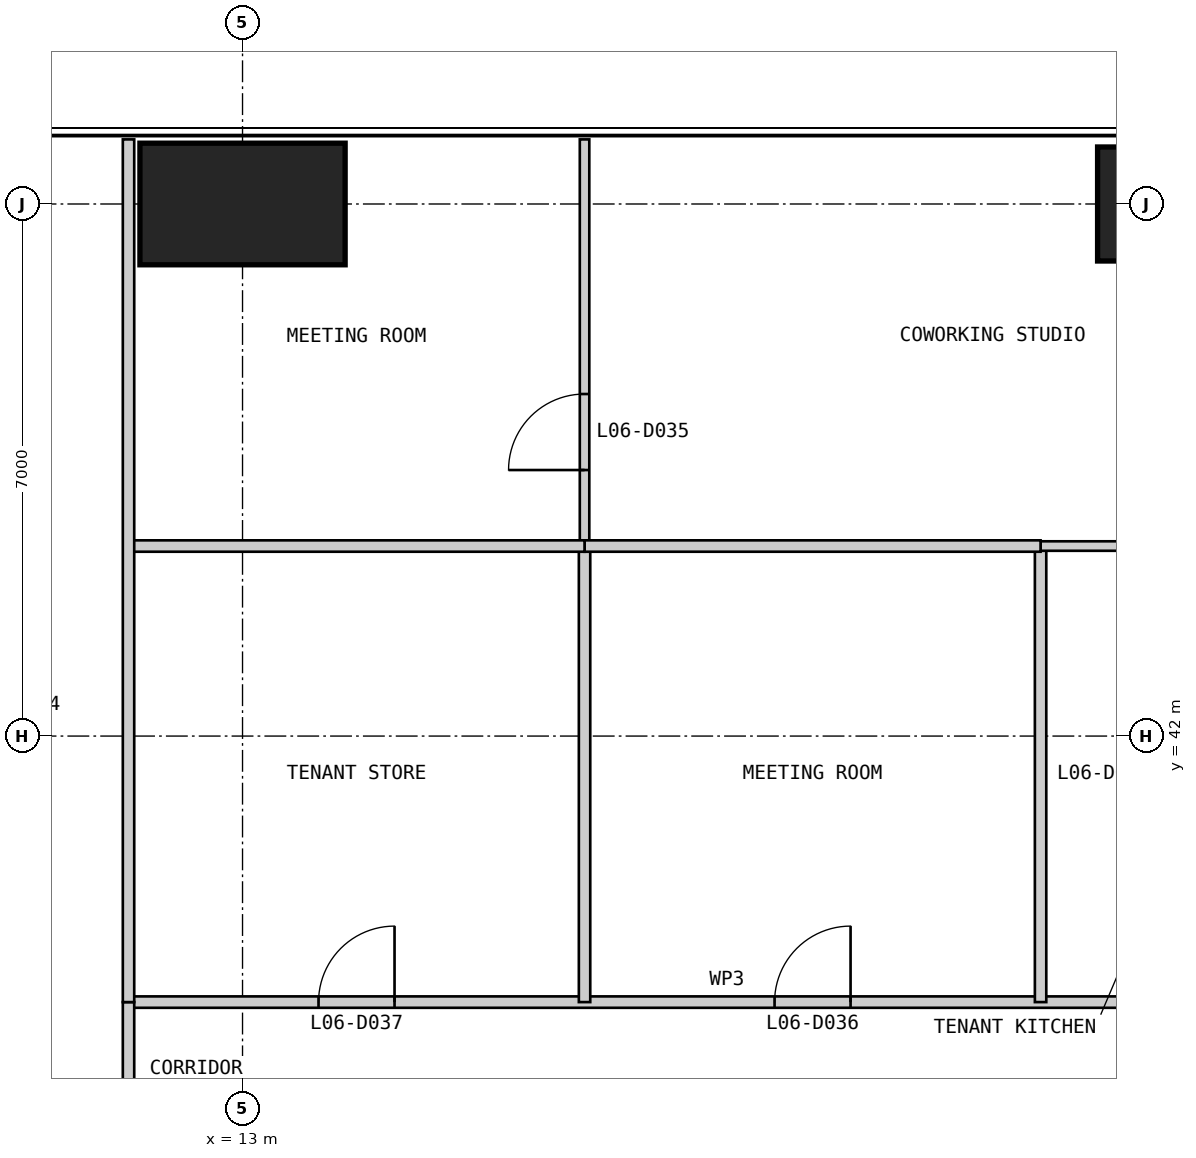
"""IFC4 building model, lengths in metres.
Left out: names, types, materials, properties, quantities, classifications, styles, units other than length and angle.
Written with IfcOpenShell. Run it as: python <this file> out.ifc"""

import sys

from ifc_helpers import new_model, si_unit, direction, frame, frame_2d, origin, origin_2d, place, context, subcontext, project, spatial, rectangle, extrude, element, fill, save


model = new_model("IFC4")
c1 = context("Model", 3, precision=1e-05, world=origin(), true_north=direction((0.0, 1.0)))
c2 = subcontext(c1, "Body", "Model", "MODEL_VIEW")
j1 = project(units=[si_unit("LENGTHUNIT", "METRE"), si_unit("PLANEANGLEUNIT", "RADIAN")], contexts=[c1])
p1 = place(None, origin())
s1 = spatial("IfcSite", under=j1, at=p1, CompositionType="ELEMENT")
p2 = place(p1, origin())
s2 = spatial("IfcBuilding", under=s1, at=p2, CompositionType="ELEMENT")
p3 = place(p2, frame((0.0, 0.0, 31.0)))
s3 = spatial("IfcBuildingStorey", under=s2, at=p3, CompositionType="ELEMENT", Elevation=31.0)
p4 = place(p3, frame((25.0, 49.0, 0.0), z_axis=(0.0, 0.0, 1.0), x_axis=(1.0, 0.0, 0.0)))
e1 = element("IfcColumn", 1, at=p4, inside=s3, PredefinedType="COLUMN", context=c2, shape_type="SweptSolid", body=[
    extrude(rectangle(XDim=1.5, YDim=1.5, at=origin_2d()), origin(), (0.0, 0.0, 1.0), 4.0),
])
p5 = place(p3, frame((13.0, 49.0, 0.0), z_axis=(0.0, 0.0, 1.0), x_axis=(1.0, 0.0, 0.0)))
e2 = element("IfcColumn", 2, at=p5, inside=s3, PredefinedType="COLUMN", context=c2, shape_type="SweptSolid", body=[
    extrude(rectangle(XDim=2.7, YDim=1.6, at=origin_2d()), origin(), (0.0, 0.0, 1.0), 4.0),
])
p6 = place(p3, frame((38.5, 38.5, 0.0), z_axis=(0.0, 0.0, 1.0), x_axis=(-1.0, 0.0, 0.0)))
e3 = element("IfcWall", 3, at=p6, inside=s3, PredefinedType="PARTITIONING", context=c2, shape_type="SweptSolid", body=[
    extrude(rectangle(XDim=27.0, YDim=0.15, at=frame_2d((13.5, 0.0))), origin(), (0.0, 0.0, 1.0), 3.85),
])
p7 = place(p6, frame((5.5, 0.0, 0.0)))
e4 = element("IfcOpeningElement", 4, at=p7, cuts=e3, PredefinedType="OPENING", context=c2, shape_type="SweptSolid", body=[
    extrude(rectangle(XDim=1.0, YDim=2.2, at=frame_2d((0.5, 1.1))), frame((0.0, 0.085, 0.0), z_axis=(0.0, -1.0, 0.0), x_axis=(1.0, 0.0, 0.0)), (0.0, 0.0, 1.0), 0.17),
])
p8 = place(p6, frame((17.5, 0.0, 0.0)))
e5 = element("IfcOpeningElement", 5, at=p8, cuts=e3, PredefinedType="OPENING", context=c2, shape_type="SweptSolid", body=[
    extrude(rectangle(XDim=1.0, YDim=2.2, at=frame_2d((0.5, 1.1))), frame((0.0, 0.085, 0.0), z_axis=(0.0, -1.0, 0.0), x_axis=(1.0, 0.0, 0.0)), (0.0, 0.0, 1.0), 0.17),
])
p9 = place(p6, frame((23.5, 0.0, 0.0)))
e6 = element("IfcOpeningElement", 6, at=p9, cuts=e3, PredefinedType="OPENING", context=c2, shape_type="SweptSolid", body=[
    extrude(rectangle(XDim=1.0, YDim=2.2, at=frame_2d((0.5, 1.1))), frame((0.0, 0.085, 0.0), z_axis=(0.0, -1.0, 0.0), x_axis=(1.0, 0.0, 0.0)), (0.0, 0.0, 1.0), 0.17),
])
p10 = place(p3, frame((23.5, 44.5, 0.0), z_axis=(0.0, 0.0, 1.0), x_axis=(0.0, -1.0, 0.0)))
e7 = element("IfcWall", 7, at=p10, inside=s3, PredefinedType="PARTITIONING", context=c2, shape_type="SweptSolid", body=[
    extrude(rectangle(XDim=6.0, YDim=0.15, at=frame_2d((3.0, 0.0))), origin(), (0.0, 0.0, 1.0), 3.85),
])
p11 = place(p3, frame((17.5, 49.85, 0.0), z_axis=(0.0, 0.0, 1.0), x_axis=(0.0, -1.0, 0.0)))
e8 = element("IfcWall", 8, at=p11, inside=s3, PredefinedType="PARTITIONING", context=c2, shape_type="SweptSolid", body=[
    extrude(rectangle(XDim=5.35, YDim=0.125, at=frame_2d((2.675, 0.0))), origin(), (0.0, 0.0, 1.0), 3.85),
])
p12 = place(p11, frame((3.35, 0.0, 0.0)))
e9 = element("IfcOpeningElement", 9, at=p12, cuts=e8, PredefinedType="OPENING", context=c2, shape_type="SweptSolid", body=[
    extrude(rectangle(XDim=1.0, YDim=2.2, at=frame_2d((0.5, 1.1))), frame((0.0, 0.073, 0.0), z_axis=(0.0, -1.0, 0.0), x_axis=(1.0, 0.0, 0.0)), (0.0, 0.0, 1.0), 0.145),
])
p13 = place(p3, frame((17.5, 44.5, 0.0), z_axis=(0.0, 0.0, 1.0), x_axis=(0.0, -1.0, 0.0)))
e10 = element("IfcWall", 10, at=p13, inside=s3, PredefinedType="PARTITIONING", context=c2, shape_type="SweptSolid", body=[
    extrude(rectangle(XDim=6.0, YDim=0.15, at=frame_2d((3.0, 0.0))), origin(), (0.0, 0.0, 1.0), 3.85),
])
p14 = place(p3, frame((26.5, 44.5, 0.0), z_axis=(0.0, 0.0, 1.0), x_axis=(-1.0, 0.0, 0.0)))
e11 = element("IfcWall", 11, at=p14, inside=s3, PredefinedType="PARTITIONING", context=c2, shape_type="SweptSolid", body=[
    extrude(rectangle(XDim=3.0, YDim=0.125, at=frame_2d((1.5, 0.0))), origin(), (0.0, 0.0, 1.0), 3.85),
])
for number, where, z_axis, x_axis in (
    (12, (23.5, 44.5, 0.0), (0.0, 0.0, 1.0), (-1.0, 0.0, 0.0)),
    (13, (17.5, 44.5, 0.0), (0.0, 0.0, 1.0), (-1.0, 0.0, 0.0)),
):
    element("IfcWall", number, at=place(p3, frame(where, z_axis=z_axis, x_axis=x_axis)), inside=s3, PredefinedType="PARTITIONING", context=c2, shape_type="SweptSolid", body=[
        extrude(rectangle(XDim=6.0, YDim=0.15, at=frame_2d((3.0, 0.0))), origin(), (0.0, 0.0, 1.0), 3.85),
    ])
p15 = place(p3, frame((11.5, 38.5, 0.0), z_axis=(0.0, 0.0, 1.0), x_axis=(0.0, -1.0, 0.0)))
e14 = element("IfcWall", 14, at=p15, inside=s3, PredefinedType="PARTITIONING", context=c2, shape_type="SweptSolid", body=[
    extrude(rectangle(XDim=27.0, YDim=0.15, at=frame_2d((13.5, 0.0))), origin(), (0.0, 0.0, 1.0), 3.85),
])
p16 = place(p15, frame((2.5, 0.0, 0.0)))
e15 = element("IfcOpeningElement", 15, at=p16, cuts=e14, PredefinedType="OPENING", context=c2, shape_type="SweptSolid", body=[
    extrude(rectangle(XDim=1.0, YDim=2.2, at=frame_2d((0.5, 1.1))), frame((0.0, 0.085, 0.0), z_axis=(0.0, -1.0, 0.0), x_axis=(1.0, 0.0, 0.0)), (0.0, 0.0, 1.0), 0.17),
])
p17 = place(p15, frame((11.5, 0.0, 0.0)))
e16 = element("IfcOpeningElement", 16, at=p17, cuts=e14, PredefinedType="OPENING", context=c2, shape_type="SweptSolid", body=[
    extrude(rectangle(XDim=1.0, YDim=2.2, at=frame_2d((0.5, 1.1))), frame((0.0, 0.085, 0.0), z_axis=(0.0, -1.0, 0.0), x_axis=(1.0, 0.0, 0.0)), (0.0, 0.0, 1.0), 0.17),
])
p18 = place(p15, frame((17.5, 0.0, 0.0)))
e17 = element("IfcOpeningElement", 17, at=p18, cuts=e14, PredefinedType="OPENING", context=c2, shape_type="SweptSolid", body=[
    extrude(rectangle(XDim=1.0, YDim=2.2, at=frame_2d((0.5, 1.1))), frame((0.0, 0.085, 0.0), z_axis=(0.0, -1.0, 0.0), x_axis=(1.0, 0.0, 0.0)), (0.0, 0.0, 1.0), 0.17),
])
p19 = place(p15, frame((22.0, 0.0, 0.0)))
e18 = element("IfcOpeningElement", 18, at=p19, cuts=e14, PredefinedType="OPENING", context=c2, shape_type="SweptSolid", body=[
    extrude(rectangle(XDim=1.0, YDim=2.2, at=frame_2d((0.5, 1.1))), frame((0.0, 0.085, 0.0), z_axis=(0.0, -1.0, 0.0), x_axis=(1.0, 0.0, 0.0)), (0.0, 0.0, 1.0), 0.17),
])
p20 = place(p15, frame((25.0, 0.0, 0.0)))
e19 = element("IfcOpeningElement", 19, at=p20, cuts=e14, PredefinedType="OPENING", context=c2, shape_type="SweptSolid", body=[
    extrude(rectangle(XDim=1.0, YDim=2.2, at=frame_2d((0.5, 1.1))), frame((0.0, 0.085, 0.0), z_axis=(0.0, -1.0, 0.0), x_axis=(1.0, 0.0, 0.0)), (0.0, 0.0, 1.0), 0.17),
])
p21 = place(p3, frame((11.5, 49.85, 0.0), z_axis=(0.0, 0.0, 1.0), x_axis=(0.0, -1.0, 0.0)))
e20 = element("IfcWall", 20, at=p21, inside=s3, PredefinedType="PARTITIONING", context=c2, shape_type="SweptSolid", body=[
    extrude(rectangle(XDim=11.35, YDim=0.15, at=frame_2d((5.675, 0.0))), origin(), (0.0, 0.0, 1.0), 3.85),
])
p22 = place(p12, frame((1.0, 0.0, 0.0), z_axis=(0.0, 0.0, 1.0), x_axis=(-1.0, 0.0, 0.0)))
e21 = element("IfcDoor", 21, at=p22, inside=s3, OperationType="SINGLE_SWING_LEFT", PredefinedType="DOOR", context=c2, shape_type="SweptSolid", body=[
    extrude(rectangle(XDim=1.0, YDim=2.2, at=frame_2d((0.5, 1.1))), frame((0.0, 0.025, 0.0), z_axis=(0.0, -1.0, 0.0), x_axis=(1.0, 0.0, 0.0)), (0.0, 0.0, 1.0), 0.05),
])
fill(e9, e21)
p23 = place(p8, frame((1.0, 0.0, 0.0), z_axis=(0.0, 0.0, 1.0), x_axis=(-1.0, 0.0, 0.0)))
e22 = element("IfcDoor", 22, at=p23, inside=s3, OperationType="SINGLE_SWING_RIGHT", PredefinedType="DOOR", context=c2, shape_type="SweptSolid", body=[
    extrude(rectangle(XDim=1.0, YDim=2.2, at=frame_2d((0.5, 1.1))), frame((0.0, 0.025, 0.0), z_axis=(0.0, -1.0, 0.0), x_axis=(1.0, 0.0, 0.0)), (0.0, 0.0, 1.0), 0.05),
])
fill(e5, e22)
p24 = place(p9, frame((1.0, 0.0, 0.0), z_axis=(0.0, 0.0, 1.0), x_axis=(-1.0, 0.0, 0.0)))
e23 = element("IfcDoor", 23, at=p24, inside=s3, OperationType="SINGLE_SWING_RIGHT", PredefinedType="DOOR", context=c2, shape_type="SweptSolid", body=[
    extrude(rectangle(XDim=1.0, YDim=2.2, at=frame_2d((0.5, 1.1))), frame((0.0, 0.025, 0.0), z_axis=(0.0, -1.0, 0.0), x_axis=(1.0, 0.0, 0.0)), (0.0, 0.0, 1.0), 0.05),
])
fill(e6, e23)
save(model, sys.argv[1])
